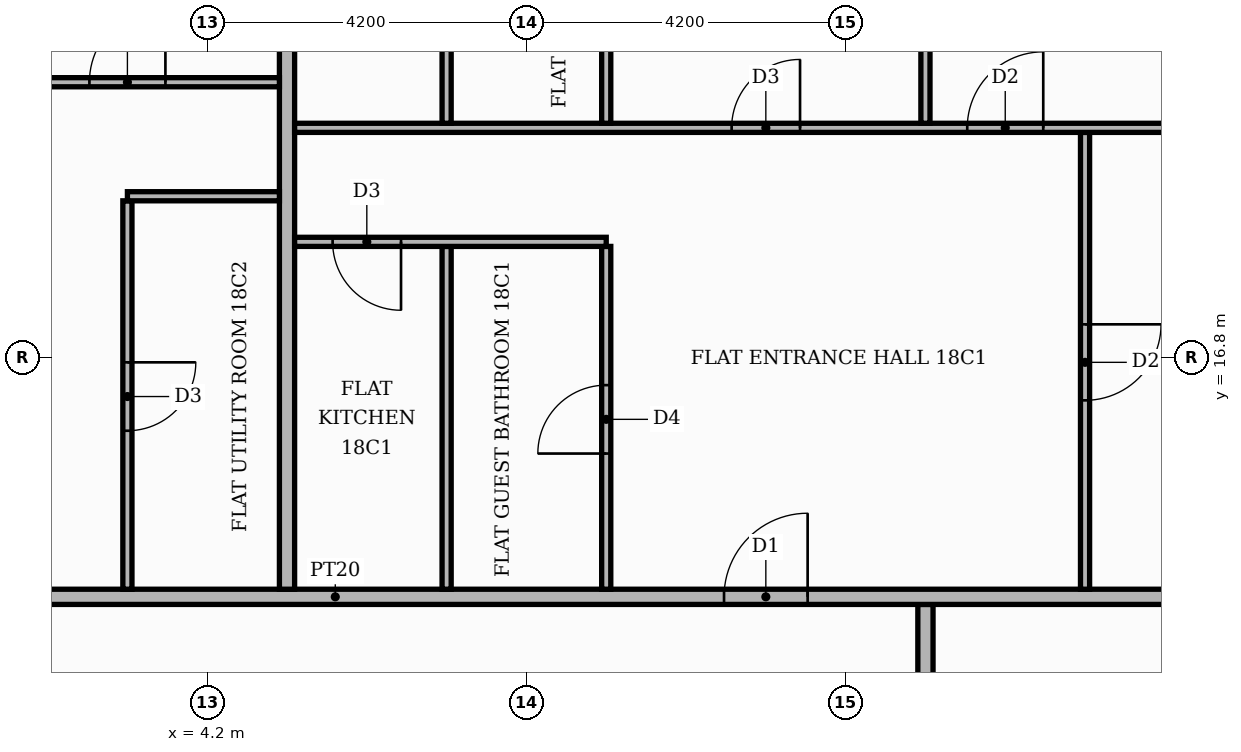
"""IFC4 building model, lengths in metres.
Left out: names, types, materials, properties, quantities, classifications, styles, units other than length and angle.
Written with IfcOpenShell. Run it as: python <this file> out.ifc"""

import sys

from ifc_helpers import new_model, si_unit, direction, frame, frame_2d, origin, place, context, subcontext, project, spatial, rectangle, extrude, element, fill, save


model = new_model("IFC4")
c1 = context("Model", 3, precision=1e-05, world=origin(), true_north=direction((0.0, 1.0)))
c2 = subcontext(c1, "Body", "Model", "MODEL_VIEW")
j1 = project(units=[si_unit("LENGTHUNIT", "METRE"), si_unit("PLANEANGLEUNIT", "RADIAN")], contexts=[c1])
p1 = place(None, origin())
s1 = spatial("IfcSite", under=j1, at=p1, CompositionType="ELEMENT")
p2 = place(p1, origin())
s2 = spatial("IfcBuilding", under=s1, at=p2, CompositionType="ELEMENT")
p3 = place(p2, frame((0.0, 0.0, 79.2)))
s3 = spatial("IfcBuildingStorey", under=s2, at=p3, CompositionType="ELEMENT", Elevation=79.2)
p4 = place(p3, frame((13.65, -5.15, 0.0), z_axis=(0.0, 0.0, 1.0), x_axis=(0.0, 1.0, 0.0)))
e1 = element("IfcWall", 1, at=p4, inside=s3, PredefinedType="PARTITIONING", context=c2, shape_type="SweptSolid", body=[
    extrude(rectangle(XDim=18.7, YDim=0.2, at=frame_2d((9.35, 0.0))), origin(), (0.0, 0.0, 1.0), 3.48),
])
p5 = place(p4, frame((5.65, 0.0, 0.0)))
e2 = element("IfcOpeningElement", 2, at=p5, cuts=e1, PredefinedType="OPENING", context=c2, shape_type="SweptSolid", body=[
    extrude(rectangle(XDim=1.1, YDim=2.4, at=frame_2d((0.55, 1.2))), frame((0.0, 0.11, 0.0), z_axis=(0.0, -1.0, 0.0), x_axis=(1.0, 0.0, 0.0)), (0.0, 0.0, 1.0), 0.22),
])
p6 = place(p3, frame((-13.65, 13.65, 0.0), z_axis=(0.0, 0.0, 1.0), x_axis=(1.0, 0.0, 0.0)))
e3 = element("IfcWall", 3, at=p6, inside=s3, PredefinedType="PARTITIONING", context=c2, shape_type="SweptSolid", body=[
    extrude(rectangle(XDim=39.07, YDim=0.2, at=frame_2d((19.535, 0.0))), origin(), (0.0, 0.0, 1.0), 3.48),
])
p7 = place(p6, frame((24.65, 0.0, 0.0)))
e4 = element("IfcOpeningElement", 4, at=p7, cuts=e3, PredefinedType="OPENING", context=c2, shape_type="SweptSolid", body=[
    extrude(rectangle(XDim=1.1, YDim=2.4, at=frame_2d((0.55, 1.2))), frame((0.0, 0.11, 0.0), z_axis=(0.0, -1.0, 0.0), x_axis=(1.0, 0.0, 0.0)), (0.0, 0.0, 1.0), 0.22),
])
p8 = place(p6, frame((14.15, 0.0, 0.0)))
e5 = element("IfcOpeningElement", 5, at=p8, cuts=e3, PredefinedType="OPENING", context=c2, shape_type="SweptSolid", body=[
    extrude(rectangle(XDim=1.1, YDim=2.4, at=frame_2d((0.55, 1.2))), frame((0.0, 0.11, 0.0), z_axis=(0.0, -1.0, 0.0), x_axis=(1.0, 0.0, 0.0)), (0.0, 0.0, 1.0), 0.22),
])
p9 = place(p3, frame((3.15, 13.75, 0.0), z_axis=(0.0, 0.0, 1.0), x_axis=(0.0, 1.0, 0.0)))
e6 = element("IfcWall", 6, at=p9, inside=s3, PredefinedType="PARTITIONING", context=c2, shape_type="SweptSolid", body=[
    extrude(rectangle(XDim=5.11, YDim=0.12, at=frame_2d((2.555, 0.0))), origin(), (0.0, 0.0, 1.0), 3.48),
])
p10 = place(p9, frame((2.085, 0.0, 0.0)))
e7 = element("IfcOpeningElement", 7, at=p10, cuts=e6, PredefinedType="OPENING", context=c2, shape_type="SweptSolid", body=[
    extrude(rectangle(XDim=0.9, YDim=2.1, at=frame_2d((0.45, 1.05))), frame((0.0, 0.07, 0.0), z_axis=(0.0, -1.0, 0.0), x_axis=(1.0, 0.0, 0.0)), (0.0, 0.0, 1.0), 0.14),
])
p11 = place(p3, frame((5.25, 13.75, 0.0), z_axis=(0.0, 0.0, 1.0), x_axis=(0.0, 1.0, 0.0)))
e8 = element("IfcWall", 8, at=p11, inside=s3, PredefinedType="PARTITIONING", context=c2, shape_type="SweptSolid", body=[
    extrude(rectangle(XDim=11.67, YDim=0.2, at=frame_2d((5.835, 0.0))), origin(), (0.0, 0.0, 1.0), 3.48),
])
p12 = place(p3, frame((7.35, 13.75, 0.0), z_axis=(0.0, 0.0, 1.0), x_axis=(0.0, 1.0, 0.0)))
e9 = element("IfcWall", 9, at=p12, inside=s3, PredefinedType="PARTITIONING", context=c2, shape_type="SweptSolid", body=[
    extrude(rectangle(XDim=4.51, YDim=0.12, at=frame_2d((2.255, 0.0))), origin(), (0.0, 0.0, 1.0), 3.48),
])
p13 = place(p3, frame((9.45, 13.75, 0.0), z_axis=(0.0, 0.0, 1.0), x_axis=(0.0, 1.0, 0.0)))
e10 = element("IfcWall", 10, at=p13, inside=s3, PredefinedType="PARTITIONING", context=c2, shape_type="SweptSolid", body=[
    extrude(rectangle(XDim=4.51, YDim=0.12, at=frame_2d((2.255, 0.0))), origin(), (0.0, 0.0, 1.0), 3.48),
])
p14 = place(p13, frame((1.785, 0.0, 0.0)))
e11 = element("IfcOpeningElement", 11, at=p14, cuts=e10, PredefinedType="OPENING", context=c2, shape_type="SweptSolid", body=[
    extrude(rectangle(XDim=0.9, YDim=2.1, at=frame_2d((0.45, 1.05))), frame((0.0, 0.07, 0.0), z_axis=(0.0, -1.0, 0.0), x_axis=(1.0, 0.0, 0.0)), (0.0, 0.0, 1.0), 0.14),
])
p15 = place(p3, frame((15.75, 13.75, 0.0), z_axis=(0.0, 0.0, 1.0), x_axis=(0.0, 1.0, 0.0)))
e12 = element("IfcWall", 12, at=p15, inside=s3, PredefinedType="PARTITIONING", context=c2, shape_type="SweptSolid", body=[
    extrude(rectangle(XDim=6.01, YDim=0.12, at=frame_2d((3.005, 0.0))), origin(), (0.0, 0.0, 1.0), 3.48),
])
p16 = place(p15, frame((2.485, 0.0, 0.0)))
e13 = element("IfcOpeningElement", 13, at=p16, cuts=e12, PredefinedType="OPENING", context=c2, shape_type="SweptSolid", body=[
    extrude(rectangle(XDim=1.0, YDim=2.1, at=frame_2d((0.5, 1.05))), frame((0.0, 0.07, 0.0), z_axis=(0.0, -1.0, 0.0), x_axis=(1.0, 0.0, 0.0)), (0.0, 0.0, 1.0), 0.14),
])
p17 = place(p3, frame((5.35, 18.32, 0.0), z_axis=(0.0, 0.0, 1.0), x_axis=(1.0, 0.0, 0.0)))
e14 = element("IfcWall", 14, at=p17, inside=s3, PredefinedType="PARTITIONING", context=c2, shape_type="SweptSolid", body=[
    extrude(rectangle(XDim=4.1, YDim=0.12, at=frame_2d((2.05, 0.0))), origin(), (0.0, 0.0, 1.0), 3.48),
])
p18 = place(p17, frame((0.5, 0.0, 0.0)))
e15 = element("IfcOpeningElement", 15, at=p18, cuts=e14, PredefinedType="OPENING", context=c2, shape_type="SweptSolid", body=[
    extrude(rectangle(XDim=0.9, YDim=2.1, at=frame_2d((0.45, 1.05))), frame((0.0, 0.07, 0.0), z_axis=(0.0, -1.0, 0.0), x_axis=(1.0, 0.0, 0.0)), (0.0, 0.0, 1.0), 0.14),
])
p19 = place(p3, frame((3.15, 18.92, 0.0), z_axis=(0.0, 0.0, 1.0), x_axis=(1.0, 0.0, 0.0)))
e16 = element("IfcWall", 16, at=p19, inside=s3, PredefinedType="PARTITIONING", context=c2, shape_type="SweptSolid", body=[
    extrude(rectangle(XDim=2.0, YDim=0.12, at=frame_2d((1.0, 0.0))), origin(), (0.0, 0.0, 1.0), 3.48),
])
p20 = place(p3, frame((5.35, 19.82, 0.0), z_axis=(0.0, 0.0, 1.0), x_axis=(1.0, 0.0, 0.0)))
e17 = element("IfcWall", 17, at=p20, inside=s3, PredefinedType="PARTITIONING", context=c2, shape_type="SweptSolid", body=[
    extrude(rectangle(XDim=12.05, YDim=0.12, at=frame_2d((6.025, 0.0))), origin(), (0.0, 0.0, 1.0), 3.48),
])
p21 = place(p20, frame((8.85, 0.0, 0.0)))
e18 = element("IfcOpeningElement", 18, at=p21, cuts=e17, PredefinedType="OPENING", context=c2, shape_type="SweptSolid", body=[
    extrude(rectangle(XDim=1.0, YDim=2.1, at=frame_2d((0.5, 1.05))), frame((0.0, 0.07, 0.0), z_axis=(0.0, -1.0, 0.0), x_axis=(1.0, 0.0, 0.0)), (0.0, 0.0, 1.0), 0.14),
])
p22 = place(p20, frame((5.75, 0.0, 0.0)))
e19 = element("IfcOpeningElement", 19, at=p22, cuts=e17, PredefinedType="OPENING", context=c2, shape_type="SweptSolid", body=[
    extrude(rectangle(XDim=0.9, YDim=2.1, at=frame_2d((0.45, 1.05))), frame((0.0, 0.07, 0.0), z_axis=(0.0, -1.0, 0.0), x_axis=(1.0, 0.0, 0.0)), (0.0, 0.0, 1.0), 0.14),
])
p23 = place(p3, frame((7.35, 19.88, 0.0), z_axis=(0.0, 0.0, 1.0), x_axis=(0.0, 1.0, 0.0)))
e20 = element("IfcWall", 20, at=p23, inside=s3, PredefinedType="PARTITIONING", context=c2, shape_type="SweptSolid", body=[
    extrude(rectangle(XDim=5.54, YDim=0.12, at=frame_2d((2.77, 0.0))), origin(), (0.0, 0.0, 1.0), 3.48),
])
p24 = place(p23, frame((2.44, 0.0, 0.0)))
e21 = element("IfcOpeningElement", 21, at=p24, cuts=e20, PredefinedType="OPENING", context=c2, shape_type="SweptSolid", body=[
    extrude(rectangle(XDim=0.9, YDim=2.1, at=frame_2d((0.45, 1.05))), frame((0.0, 0.07, 0.0), z_axis=(0.0, -1.0, 0.0), x_axis=(1.0, 0.0, 0.0)), (0.0, 0.0, 1.0), 0.14),
])
p25 = place(p3, frame((9.45, 19.88, 0.0), z_axis=(0.0, 0.0, 1.0), x_axis=(0.0, 1.0, 0.0)))
e22 = element("IfcWall", 22, at=p25, inside=s3, PredefinedType="PARTITIONING", context=c2, shape_type="SweptSolid", body=[
    extrude(rectangle(XDim=5.54, YDim=0.12, at=frame_2d((2.77, 0.0))), origin(), (0.0, 0.0, 1.0), 3.48),
])
p26 = place(p25, frame((2.44, 0.0, 0.0)))
e23 = element("IfcOpeningElement", 23, at=p26, cuts=e22, PredefinedType="OPENING", context=c2, shape_type="SweptSolid", body=[
    extrude(rectangle(XDim=0.9, YDim=2.1, at=frame_2d((0.45, 1.05))), frame((0.0, 0.07, 0.0), z_axis=(0.0, -1.0, 0.0), x_axis=(1.0, 0.0, 0.0)), (0.0, 0.0, 1.0), 0.14),
])
p27 = place(p3, frame((13.65, 19.88, 0.0), z_axis=(0.0, 0.0, 1.0), x_axis=(0.0, 1.0, 0.0)))
e24 = element("IfcWall", 24, at=p27, inside=s3, PredefinedType="PARTITIONING", context=c2, shape_type="SweptSolid", body=[
    extrude(rectangle(XDim=5.54, YDim=0.12, at=frame_2d((2.77, 0.0))), origin(), (0.0, 0.0, 1.0), 3.48),
])
p28 = place(p3, frame((-13.55, 20.42, 0.0), z_axis=(0.0, 0.0, 1.0), x_axis=(1.0, 0.0, 0.0)))
e25 = element("IfcWall", 25, at=p28, inside=s3, PredefinedType="PARTITIONING", context=c2, shape_type="SweptSolid", body=[
    extrude(rectangle(XDim=18.7, YDim=0.12, at=frame_2d((9.35, 0.0))), origin(), (0.0, 0.0, 1.0), 3.48),
])
p29 = place(p28, frame((16.2, 0.0, 0.0)))
e26 = element("IfcOpeningElement", 26, at=p29, cuts=e25, PredefinedType="OPENING", context=c2, shape_type="SweptSolid", body=[
    extrude(rectangle(XDim=1.0, YDim=2.1, at=frame_2d((0.5, 1.05))), frame((0.0, 0.07, 0.0), z_axis=(0.0, -1.0, 0.0), x_axis=(1.0, 0.0, 0.0)), (0.0, 0.0, 1.0), 0.14),
])
p30 = place(p28, frame((12.05, 0.0, 0.0)))
e27 = element("IfcOpeningElement", 27, at=p30, cuts=e25, PredefinedType="OPENING", context=c2, shape_type="SweptSolid", body=[
    extrude(rectangle(XDim=0.9, YDim=2.1, at=frame_2d((0.45, 1.05))), frame((0.0, 0.07, 0.0), z_axis=(0.0, -1.0, 0.0), x_axis=(1.0, 0.0, 0.0)), (0.0, 0.0, 1.0), 0.14),
])
p31 = place(p28, frame((5.75, 0.0, 0.0)))
e28 = element("IfcOpeningElement", 28, at=p31, cuts=e25, PredefinedType="OPENING", context=c2, shape_type="SweptSolid", body=[
    extrude(rectangle(XDim=0.9, YDim=2.1, at=frame_2d((0.45, 1.05))), frame((0.0, 0.07, 0.0), z_axis=(0.0, -1.0, 0.0), x_axis=(1.0, 0.0, 0.0)), (0.0, 0.0, 1.0), 0.14),
])
p32 = place(p7, origin())
e29 = element("IfcDoor", 29, at=p32, inside=s3, OperationType="SINGLE_SWING_RIGHT", PredefinedType="DOOR", context=c2, shape_type="SweptSolid", body=[
    extrude(rectangle(XDim=1.1, YDim=2.4, at=frame_2d((0.55, 1.2))), frame((0.0, 0.025, 0.0), z_axis=(0.0, -1.0, 0.0), x_axis=(1.0, 0.0, 0.0)), (0.0, 0.0, 1.0), 0.05),
])
fill(e4, e29)
p33 = place(p16, frame((1.0, 0.0, 0.0), z_axis=(0.0, 0.0, 1.0), x_axis=(-1.0, 0.0, 0.0)))
e30 = element("IfcDoor", 30, at=p33, inside=s3, OperationType="SINGLE_SWING_RIGHT", PredefinedType="DOOR", context=c2, shape_type="SweptSolid", body=[
    extrude(rectangle(XDim=1.0, YDim=2.1, at=frame_2d((0.5, 1.05))), frame((0.0, 0.025, 0.0), z_axis=(0.0, -1.0, 0.0), x_axis=(1.0, 0.0, 0.0)), (0.0, 0.0, 1.0), 0.05),
])
fill(e13, e30)
p34 = place(p14, origin())
e31 = element("IfcDoor", 31, at=p34, inside=s3, OperationType="SINGLE_SWING_LEFT", PredefinedType="DOOR", context=c2, shape_type="SweptSolid", body=[
    extrude(rectangle(XDim=0.9, YDim=2.1, at=frame_2d((0.45, 1.05))), frame((0.0, 0.025, 0.0), z_axis=(0.0, -1.0, 0.0), x_axis=(1.0, 0.0, 0.0)), (0.0, 0.0, 1.0), 0.05),
])
fill(e11, e31)
p35 = place(p18, frame((0.9, 0.0, 0.0), z_axis=(0.0, 0.0, 1.0), x_axis=(-1.0, 0.0, 0.0)))
e32 = element("IfcDoor", 32, at=p35, inside=s3, OperationType="SINGLE_SWING_RIGHT", PredefinedType="DOOR", context=c2, shape_type="SweptSolid", body=[
    extrude(rectangle(XDim=0.9, YDim=2.1, at=frame_2d((0.45, 1.05))), frame((0.0, 0.025, 0.0), z_axis=(0.0, -1.0, 0.0), x_axis=(1.0, 0.0, 0.0)), (0.0, 0.0, 1.0), 0.05),
])
fill(e15, e32)
p36 = place(p21, origin())
e33 = element("IfcDoor", 33, at=p36, inside=s3, OperationType="SINGLE_SWING_RIGHT", PredefinedType="DOOR", context=c2, shape_type="SweptSolid", body=[
    extrude(rectangle(XDim=1.0, YDim=2.1, at=frame_2d((0.5, 1.05))), frame((0.0, 0.025, 0.0), z_axis=(0.0, -1.0, 0.0), x_axis=(1.0, 0.0, 0.0)), (0.0, 0.0, 1.0), 0.05),
])
fill(e18, e33)
p37 = place(p22, origin())
e34 = element("IfcDoor", 34, at=p37, inside=s3, OperationType="SINGLE_SWING_RIGHT", PredefinedType="DOOR", context=c2, shape_type="SweptSolid", body=[
    extrude(rectangle(XDim=0.9, YDim=2.1, at=frame_2d((0.45, 1.05))), frame((0.0, 0.025, 0.0), z_axis=(0.0, -1.0, 0.0), x_axis=(1.0, 0.0, 0.0)), (0.0, 0.0, 1.0), 0.05),
])
fill(e19, e34)
p38 = place(p10, frame((0.9, 0.0, 0.0), z_axis=(0.0, 0.0, 1.0), x_axis=(-1.0, 0.0, 0.0)))
e35 = element("IfcDoor", 35, at=p38, inside=s3, OperationType="SINGLE_SWING_RIGHT", PredefinedType="DOOR", context=c2, shape_type="SweptSolid", body=[
    extrude(rectangle(XDim=0.9, YDim=2.1, at=frame_2d((0.45, 1.05))), frame((0.0, 0.025, 0.0), z_axis=(0.0, -1.0, 0.0), x_axis=(1.0, 0.0, 0.0)), (0.0, 0.0, 1.0), 0.05),
])
fill(e7, e35)
p39 = place(p29, origin())
e36 = element("IfcDoor", 36, at=p39, inside=s3, OperationType="SINGLE_SWING_RIGHT", PredefinedType="DOOR", context=c2, shape_type="SweptSolid", body=[
    extrude(rectangle(XDim=1.0, YDim=2.1, at=frame_2d((0.5, 1.05))), frame((0.0, 0.025, 0.0), z_axis=(0.0, -1.0, 0.0), x_axis=(1.0, 0.0, 0.0)), (0.0, 0.0, 1.0), 0.05),
])
fill(e26, e36)
save(model, sys.argv[1])
